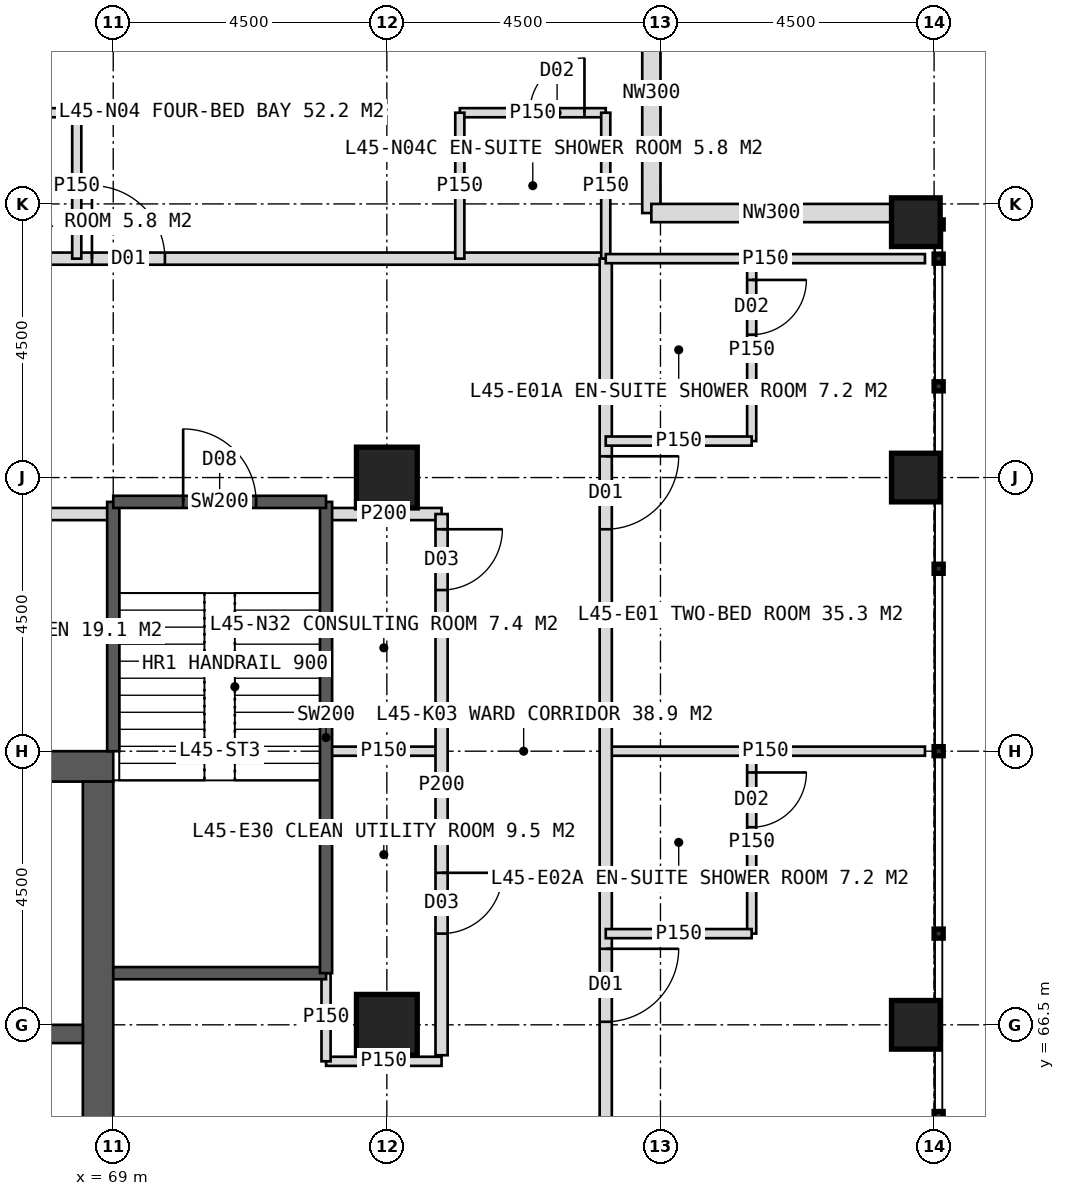
"""IFC4 building model, lengths in metres.
Left out: names, types, materials, properties, quantities, classifications, styles, units other than length and angle.
Written with IfcOpenShell. Run it as: python <this file> out.ifc"""

import sys

from ifc_helpers import new_model, si_unit, direction, frame, frame_2d, origin, origin_2d, place, context, subcontext, project, spatial, rectangle, hollow_rectangle, extrude, element, fill, save


model = new_model("IFC4")
c1 = context("Model", 3, precision=1e-05, world=origin(), true_north=direction((0.0, 1.0)))
c2 = subcontext(c1, "Body", "Model", "MODEL_VIEW")
j1 = project(units=[si_unit("LENGTHUNIT", "METRE"), si_unit("PLANEANGLEUNIT", "RADIAN")], contexts=[c1])
p1 = place(None, origin())
s1 = spatial("IfcSite", under=j1, at=p1, CompositionType="ELEMENT")
p2 = place(p1, origin())
s2 = spatial("IfcBuilding", under=s1, at=p2, CompositionType="ELEMENT")
p3 = place(p2, frame((0.0, 0.0, 189.0)))
s3 = spatial("IfcBuildingStorey", under=s2, at=p3, CompositionType="ELEMENT", Elevation=189.0)
p4 = place(p3, frame((51.0, 70.75, 0.0), z_axis=(0.0, 0.0, 1.0), x_axis=(1.0, 0.0, 0.0)))
e1 = element("IfcWall", 1, at=p4, inside=s3, PredefinedType="SHEAR", context=c2, shape_type="SweptSolid", body=[
    extrude(rectangle(XDim=18.0, YDim=0.5, at=frame_2d((9.0, 0.0))), origin(), (0.0, 0.0, 1.0), 4.0),
])
p5 = place(p4, frame((8.1, 0.0, 0.0)))
e2 = element("IfcOpeningElement", 2, at=p5, cuts=e1, PredefinedType="OPENING", context=c2, shape_type="SweptSolid", body=[
    extrude(rectangle(XDim=1.8, YDim=2.2, at=frame_2d((0.9, 1.1))), frame((0.0, 0.26, 0.0), z_axis=(0.0, -1.0, 0.0), x_axis=(1.0, 0.0, 0.0)), (0.0, 0.0, 1.0), 0.52),
])
p6 = place(p3, frame((68.75, 53.5, 0.0), z_axis=(0.0, 0.0, 1.0), x_axis=(0.0, 1.0, 0.0)))
e3 = element("IfcWall", 3, at=p6, inside=s3, PredefinedType="SHEAR", context=c2, shape_type="SweptSolid", body=[
    extrude(rectangle(XDim=17.0, YDim=0.5, at=frame_2d((8.5, 0.0))), origin(), (0.0, 0.0, 1.0), 4.0),
])
p7 = place(p6, frame((9.6, 0.0, 0.0)))
e4 = element("IfcOpeningElement", 4, at=p7, cuts=e3, PredefinedType="OPENING", context=c2, shape_type="SweptSolid", body=[
    extrude(rectangle(XDim=1.5, YDim=2.2, at=frame_2d((0.75, 1.1))), frame((0.0, 0.26, 0.0), z_axis=(0.0, -1.0, 0.0), x_axis=(1.0, 0.0, 0.0)), (0.0, 0.0, 1.0), 0.52),
])
p8 = place(p3, frame((65.2, 66.35, 0.0), z_axis=(0.0, 0.0, 1.0), x_axis=(1.0, 0.0, 0.0)))
e5 = element("IfcWall", 5, at=p8, inside=s3, PredefinedType="SHEAR", context=c2, shape_type="SweptSolid", body=[
    extrude(rectangle(XDim=3.3, YDim=0.3, at=frame_2d((1.65, 0.0))), origin(), (0.0, 0.0, 1.0), 4.0),
])
p9 = place(p8, frame((1.05, 0.0, 0.0)))
e6 = element("IfcOpeningElement", 6, at=p9, cuts=e5, PredefinedType="OPENING", context=c2, shape_type="SweptSolid", body=[
    extrude(rectangle(XDim=1.2, YDim=2.2, at=frame_2d((0.6, 1.1))), frame((0.0, 0.16, 0.0), z_axis=(0.0, -1.0, 0.0), x_axis=(1.0, 0.0, 0.0)), (0.0, 0.0, 1.0), 0.32),
])
for number, where, z_axis, x_axis in (
    (7, (73.5, 75.5, 0.0), (0.0, 0.0, 1.0), (1.0, 0.0, 0.0)),
    (8, (73.5, 66.5, 0.0), (0.0, 0.0, 1.0), (1.0, 0.0, 0.0)),
):
    element("IfcColumn", number, at=place(p3, frame(where, z_axis=z_axis, x_axis=x_axis)), inside=s3, PredefinedType="COLUMN", context=c2, shape_type="SweptSolid", body=[
        extrude(hollow_rectangle(XDim=1.0, YDim=1.0, WallThickness=0.1, at=origin_2d()), origin(), (0.0, 0.0, 1.0), 4.0),
    ])
for number, where, z_axis, x_axis in (
    (9, (82.2, 66.5, 0.0), (0.0, 0.0, 1.0), (1.0, 0.0, 0.0)),
    (10, (82.2, 75.5, 0.0), (0.0, 0.0, 1.0), (1.0, 0.0, 0.0)),
    (11, (82.2, 79.7, 0.0), (0.0, 0.0, 1.0), (1.0, 0.0, 0.0)),
):
    element("IfcColumn", number, at=place(p3, frame(where, z_axis=z_axis, x_axis=x_axis)), inside=s3, PredefinedType="COLUMN", context=c2, shape_type="SweptSolid", body=[
        extrude(hollow_rectangle(XDim=0.8, YDim=0.8, WallThickness=0.08, at=origin_2d()), origin(), (0.0, 0.0, 1.0), 4.0),
    ])
for number, where, z_axis, x_axis in (
    (12, (77.85, 83.8, 0.0), (0.0, 0.0, 1.0), (0.0, -1.0, 0.0)),
    (13, (77.85, 79.85, 0.0), (0.0, 0.0, 1.0), (1.0, 0.0, 0.0)),
):
    element("IfcWall", number, at=place(p3, frame(where, z_axis=z_axis, x_axis=x_axis)), inside=s3, PredefinedType="ELEMENTEDWALL", context=c2, shape_type="SweptSolid", body=[
        extrude(rectangle(XDim=3.95, YDim=0.3, at=frame_2d((1.975, 0.0))), origin(), (0.0, 0.0, 1.0), 2.85),
    ])
p10 = place(p3, frame((42.9, 79.1, 0.0), z_axis=(0.0, 0.0, 1.0), x_axis=(1.0, 0.0, 0.0)))
e14 = element("IfcWall", 14, at=p10, inside=s3, PredefinedType="PARTITIONING", context=c2, shape_type="SweptSolid", body=[
    extrude(rectangle(XDim=34.2, YDim=0.2, at=frame_2d((17.1, 0.0))), origin(), (0.0, 0.0, 1.0), 3.75),
])
p11 = place(p10, frame((3.25, 0.0, 0.0)))
e15 = element("IfcOpeningElement", 15, at=p11, cuts=e14, PredefinedType="OPENING", context=c2, shape_type="SweptSolid", body=[
    extrude(rectangle(XDim=1.2, YDim=2.2, at=frame_2d((0.6, 1.1))), frame((0.0, 0.11, 0.0), z_axis=(0.0, -1.0, 0.0), x_axis=(1.0, 0.0, 0.0)), (0.0, 0.0, 1.0), 0.22),
])
p12 = place(p10, frame((10.6, 0.0, 0.0)))
e16 = element("IfcOpeningElement", 16, at=p12, cuts=e14, PredefinedType="OPENING", context=c2, shape_type="SweptSolid", body=[
    extrude(rectangle(XDim=1.0, YDim=2.1, at=frame_2d((0.5, 1.05))), frame((0.0, 0.11, 0.0), z_axis=(0.0, -1.0, 0.0), x_axis=(1.0, 0.0, 0.0)), (0.0, 0.0, 1.0), 0.22),
])
p13 = place(p10, frame((17.35, 0.0, 0.0)))
e17 = element("IfcOpeningElement", 17, at=p13, cuts=e14, PredefinedType="OPENING", context=c2, shape_type="SweptSolid", body=[
    extrude(rectangle(XDim=1.2, YDim=2.2, at=frame_2d((0.6, 1.1))), frame((0.0, 0.11, 0.0), z_axis=(0.0, -1.0, 0.0), x_axis=(1.0, 0.0, 0.0)), (0.0, 0.0, 1.0), 0.22),
])
p14 = place(p10, frame((25.75, 0.0, 0.0)))
e18 = element("IfcOpeningElement", 18, at=p14, cuts=e14, PredefinedType="OPENING", context=c2, shape_type="SweptSolid", body=[
    extrude(rectangle(XDim=1.2, YDim=2.2, at=frame_2d((0.6, 1.1))), frame((0.0, 0.11, 0.0), z_axis=(0.0, -1.0, 0.0), x_axis=(1.0, 0.0, 0.0)), (0.0, 0.0, 1.0), 0.22),
])
p15 = place(p3, frame((66.0, 81.5, 0.0), z_axis=(0.0, 0.0, 1.0), x_axis=(1.0, 0.0, 0.0)))
e19 = element("IfcWall", 19, at=p15, inside=s3, PredefinedType="PARTITIONING", context=c2, shape_type="SweptSolid", body=[
    extrude(rectangle(XDim=2.4, YDim=0.15, at=frame_2d((1.2, 0.0))), origin(), (0.0, 0.0, 1.0), 3.75),
])
p16 = place(p15, frame((0.35, 0.0, 0.0)))
e20 = element("IfcOpeningElement", 20, at=p16, cuts=e19, PredefinedType="OPENING", context=c2, shape_type="SweptSolid", body=[
    extrude(rectangle(XDim=0.9, YDim=2.1, at=frame_2d((0.45, 1.05))), frame((0.0, 0.085, 0.0), z_axis=(0.0, -1.0, 0.0), x_axis=(1.0, 0.0, 0.0)), (0.0, 0.0, 1.0), 0.17),
])
p17 = place(p3, frame((68.4, 79.1, 0.0), z_axis=(0.0, 0.0, 1.0), x_axis=(0.0, 1.0, 0.0)))
e21 = element("IfcWall", 21, at=p17, inside=s3, PredefinedType="PARTITIONING", context=c2, shape_type="SweptSolid", body=[
    extrude(rectangle(XDim=2.4, YDim=0.15, at=frame_2d((1.2, 0.0))), origin(), (0.0, 0.0, 1.0), 3.75),
])
p18 = place(p3, frame((74.7, 81.5, 0.0), z_axis=(0.0, 0.0, 1.0), x_axis=(1.0, 0.0, 0.0)))
e22 = element("IfcWall", 22, at=p18, inside=s3, PredefinedType="PARTITIONING", context=c2, shape_type="SweptSolid", body=[
    extrude(rectangle(XDim=2.4, YDim=0.15, at=frame_2d((1.2, 0.0))), origin(), (0.0, 0.0, 1.0), 3.75),
])
p19 = place(p18, frame((1.15, 0.0, 0.0)))
e23 = element("IfcOpeningElement", 23, at=p19, cuts=e22, PredefinedType="OPENING", context=c2, shape_type="SweptSolid", body=[
    extrude(rectangle(XDim=0.9, YDim=2.1, at=frame_2d((0.45, 1.05))), frame((0.0, 0.085, 0.0), z_axis=(0.0, -1.0, 0.0), x_axis=(1.0, 0.0, 0.0)), (0.0, 0.0, 1.0), 0.17),
])
for number, where, z_axis, x_axis in (
    (24, (74.7, 79.1, 0.0), (0.0, 0.0, 1.0), (0.0, 1.0, 0.0)),
    (25, (77.1, 79.1, 0.0), (0.0, 0.0, 1.0), (0.0, 1.0, 0.0)),
):
    element("IfcWall", number, at=place(p3, frame(where, z_axis=z_axis, x_axis=x_axis)), inside=s3, PredefinedType="PARTITIONING", context=c2, shape_type="SweptSolid", body=[
        extrude(rectangle(XDim=2.4, YDim=0.15, at=frame_2d((1.2, 0.0))), origin(), (0.0, 0.0, 1.0), 3.75),
    ])
p20 = place(p3, frame((62.25, 74.9, 0.0), z_axis=(0.0, 0.0, 1.0), x_axis=(1.0, 0.0, 0.0)))
e26 = element("IfcWall", 26, at=p20, inside=s3, PredefinedType="PARTITIONING", context=c2, shape_type="SweptSolid", body=[
    extrude(rectangle(XDim=6.75, YDim=0.2, at=frame_2d((3.375, 0.0))), origin(), (0.0, 0.0, 1.0), 3.75),
])
p21 = place(p20, frame((4.3, 0.0, 0.0)))
e27 = element("IfcOpeningElement", 27, at=p21, cuts=e26, PredefinedType="OPENING", context=c2, shape_type="SweptSolid", body=[
    extrude(rectangle(XDim=1.0, YDim=2.1, at=frame_2d((0.5, 1.05))), frame((0.0, 0.11, 0.0), z_axis=(0.0, -1.0, 0.0), x_axis=(1.0, 0.0, 0.0)), (0.0, 0.0, 1.0), 0.22),
])
p22 = place(p3, frame((72.5, 74.9, 0.0), z_axis=(0.0, 0.0, 1.0), x_axis=(1.0, 0.0, 0.0)))
e28 = element("IfcWall", 28, at=p22, inside=s3, PredefinedType="PARTITIONING", context=c2, shape_type="SweptSolid", body=[
    extrude(rectangle(XDim=1.9, YDim=0.2, at=frame_2d((0.95, 0.0))), origin(), (0.0, 0.0, 1.0), 3.75),
])
p23 = place(p3, frame((77.1, 71.0, 0.0), z_axis=(0.0, 0.0, 1.0), x_axis=(1.0, 0.0, 0.0)))
e29 = element("IfcWall", 29, at=p23, inside=s3, PredefinedType="PARTITIONING", context=c2, shape_type="SweptSolid", body=[
    extrude(rectangle(XDim=5.25, YDim=0.15, at=frame_2d((2.625, 0.0))), origin(), (0.0, 0.0, 1.0), 3.75),
])
p24 = place(p3, frame((77.1, 79.1, 0.0), z_axis=(0.0, 0.0, 1.0), x_axis=(0.0, -1.0, 0.0)))
e30 = element("IfcWall", 30, at=p24, inside=s3, PredefinedType="PARTITIONING", context=c2, shape_type="SweptSolid", body=[
    extrude(rectangle(XDim=34.2, YDim=0.2, at=frame_2d((17.1, 0.0))), origin(), (0.0, 0.0, 1.0), 3.75),
])
p25 = place(p24, frame((3.25, 0.0, 0.0)))
e31 = element("IfcOpeningElement", 31, at=p25, cuts=e30, PredefinedType="OPENING", context=c2, shape_type="SweptSolid", body=[
    extrude(rectangle(XDim=1.2, YDim=2.2, at=frame_2d((0.6, 1.1))), frame((0.0, 0.11, 0.0), z_axis=(0.0, -1.0, 0.0), x_axis=(1.0, 0.0, 0.0)), (0.0, 0.0, 1.0), 0.22),
])
p26 = place(p24, frame((11.35, 0.0, 0.0)))
e32 = element("IfcOpeningElement", 32, at=p26, cuts=e30, PredefinedType="OPENING", context=c2, shape_type="SweptSolid", body=[
    extrude(rectangle(XDim=1.2, YDim=2.2, at=frame_2d((0.6, 1.1))), frame((0.0, 0.11, 0.0), z_axis=(0.0, -1.0, 0.0), x_axis=(1.0, 0.0, 0.0)), (0.0, 0.0, 1.0), 0.22),
])
p27 = place(p24, frame((19.75, 0.0, 0.0)))
e33 = element("IfcOpeningElement", 33, at=p27, cuts=e30, PredefinedType="OPENING", context=c2, shape_type="SweptSolid", body=[
    extrude(rectangle(XDim=1.2, YDim=2.2, at=frame_2d((0.6, 1.1))), frame((0.0, 0.11, 0.0), z_axis=(0.0, -1.0, 0.0), x_axis=(1.0, 0.0, 0.0)), (0.0, 0.0, 1.0), 0.22),
])
p28 = place(p24, frame((25.75, 0.0, 0.0)))
e34 = element("IfcOpeningElement", 34, at=p28, cuts=e30, PredefinedType="OPENING", context=c2, shape_type="SweptSolid", body=[
    extrude(rectangle(XDim=1.2, YDim=2.2, at=frame_2d((0.6, 1.1))), frame((0.0, 0.11, 0.0), z_axis=(0.0, -1.0, 0.0), x_axis=(1.0, 0.0, 0.0)), (0.0, 0.0, 1.0), 0.22),
])
p29 = place(p3, frame((77.1, 79.1, 0.0), z_axis=(0.0, 0.0, 1.0), x_axis=(1.0, 0.0, 0.0)))
e35 = element("IfcWall", 35, at=p29, inside=s3, PredefinedType="PARTITIONING", context=c2, shape_type="SweptSolid", body=[
    extrude(rectangle(XDim=5.25, YDim=0.15, at=frame_2d((2.625, 0.0))), origin(), (0.0, 0.0, 1.0), 3.75),
])
p30 = place(p3, frame((79.5, 79.1, 0.0), z_axis=(0.0, 0.0, 1.0), x_axis=(0.0, -1.0, 0.0)))
e36 = element("IfcWall", 36, at=p30, inside=s3, PredefinedType="PARTITIONING", context=c2, shape_type="SweptSolid", body=[
    extrude(rectangle(XDim=3.0, YDim=0.15, at=frame_2d((1.5, 0.0))), origin(), (0.0, 0.0, 1.0), 3.75),
])
p31 = place(p30, frame((0.35, 0.0, 0.0)))
e37 = element("IfcOpeningElement", 37, at=p31, cuts=e36, PredefinedType="OPENING", context=c2, shape_type="SweptSolid", body=[
    extrude(rectangle(XDim=0.9, YDim=2.1, at=frame_2d((0.45, 1.05))), frame((0.0, 0.085, 0.0), z_axis=(0.0, -1.0, 0.0), x_axis=(1.0, 0.0, 0.0)), (0.0, 0.0, 1.0), 0.17),
])
p32 = place(p3, frame((77.1, 76.1, 0.0), z_axis=(0.0, 0.0, 1.0), x_axis=(1.0, 0.0, 0.0)))
e38 = element("IfcWall", 38, at=p32, inside=s3, PredefinedType="PARTITIONING", context=c2, shape_type="SweptSolid", body=[
    extrude(rectangle(XDim=2.4, YDim=0.15, at=frame_2d((1.2, 0.0))), origin(), (0.0, 0.0, 1.0), 3.75),
])
p33 = place(p3, frame((79.5, 71.0, 0.0), z_axis=(0.0, 0.0, 1.0), x_axis=(0.0, -1.0, 0.0)))
e39 = element("IfcWall", 39, at=p33, inside=s3, PredefinedType="PARTITIONING", context=c2, shape_type="SweptSolid", body=[
    extrude(rectangle(XDim=3.0, YDim=0.15, at=frame_2d((1.5, 0.0))), origin(), (0.0, 0.0, 1.0), 3.75),
])
p34 = place(p33, frame((0.35, 0.0, 0.0)))
e40 = element("IfcOpeningElement", 40, at=p34, cuts=e39, PredefinedType="OPENING", context=c2, shape_type="SweptSolid", body=[
    extrude(rectangle(XDim=0.9, YDim=2.1, at=frame_2d((0.45, 1.05))), frame((0.0, 0.085, 0.0), z_axis=(0.0, -1.0, 0.0), x_axis=(1.0, 0.0, 0.0)), (0.0, 0.0, 1.0), 0.17),
])
p35 = place(p3, frame((77.1, 68.0, 0.0), z_axis=(0.0, 0.0, 1.0), x_axis=(1.0, 0.0, 0.0)))
e41 = element("IfcWall", 41, at=p35, inside=s3, PredefinedType="PARTITIONING", context=c2, shape_type="SweptSolid", body=[
    extrude(rectangle(XDim=2.4, YDim=0.15, at=frame_2d((1.2, 0.0))), origin(), (0.0, 0.0, 1.0), 3.75),
])
p36 = place(p3, frame((72.5, 71.0, 0.0), z_axis=(0.0, 0.0, 1.0), x_axis=(1.0, 0.0, 0.0)))
e42 = element("IfcWall", 42, at=p36, inside=s3, PredefinedType="PARTITIONING", context=c2, shape_type="SweptSolid", body=[
    extrude(rectangle(XDim=1.9, YDim=0.15, at=frame_2d((0.95, 0.0))), origin(), (0.0, 0.0, 1.0), 3.75),
])
p37 = place(p3, frame((74.4, 74.9, 0.0), z_axis=(0.0, 0.0, 1.0), x_axis=(0.0, -1.0, 0.0)))
e43 = element("IfcWall", 43, at=p37, inside=s3, PredefinedType="PARTITIONING", context=c2, shape_type="SweptSolid", body=[
    extrude(rectangle(XDim=8.9, YDim=0.2, at=frame_2d((4.45, 0.0))), origin(), (0.0, 0.0, 1.0), 3.75),
])
p38 = place(p37, frame((0.25, 0.0, 0.0)))
e44 = element("IfcOpeningElement", 44, at=p38, cuts=e43, PredefinedType="OPENING", context=c2, shape_type="SweptSolid", body=[
    extrude(rectangle(XDim=1.0, YDim=2.1, at=frame_2d((0.5, 1.05))), frame((0.0, 0.11, 0.0), z_axis=(0.0, -1.0, 0.0), x_axis=(1.0, 0.0, 0.0)), (0.0, 0.0, 1.0), 0.22),
])
p39 = place(p37, frame((5.9, 0.0, 0.0)))
e45 = element("IfcOpeningElement", 45, at=p39, cuts=e43, PredefinedType="OPENING", context=c2, shape_type="SweptSolid", body=[
    extrude(rectangle(XDim=1.0, YDim=2.1, at=frame_2d((0.5, 1.05))), frame((0.0, 0.11, 0.0), z_axis=(0.0, -1.0, 0.0), x_axis=(1.0, 0.0, 0.0)), (0.0, 0.0, 1.0), 0.22),
])
p40 = place(p3, frame((72.5, 65.9, 0.0), z_axis=(0.0, 0.0, 1.0), x_axis=(1.0, 0.0, 0.0)))
e46 = element("IfcWall", 46, at=p40, inside=s3, PredefinedType="PARTITIONING", context=c2, shape_type="SweptSolid", body=[
    extrude(rectangle(XDim=1.9, YDim=0.15, at=frame_2d((0.95, 0.0))), origin(), (0.0, 0.0, 1.0), 3.75),
])
p41 = place(p3, frame((72.5, 65.9, 0.0), z_axis=(0.0, 0.0, 1.0), x_axis=(0.0, 1.0, 0.0)))
e47 = element("IfcWall", 47, at=p41, inside=s3, PredefinedType="PARTITIONING", context=c2, shape_type="SweptSolid", body=[
    extrude(rectangle(XDim=1.45, YDim=0.15, at=frame_2d((0.725, 0.0))), origin(), (0.0, 0.0, 1.0), 3.75),
])
p42 = place(p3, frame((69.0, 71.0, 0.0), z_axis=(0.0, 0.0, 1.0), x_axis=(0.0, 1.0, 0.0)))
e48 = element("IfcWall", 48, at=p42, inside=s3, PredefinedType="SOLIDWALL", context=c2, shape_type="SweptSolid", body=[
    extrude(rectangle(XDim=4.1, YDim=0.2, at=frame_2d((2.05, 0.0))), origin(), (0.0, 0.0, 1.0), 3.75),
])
p43 = place(p3, frame((69.0, 67.35, 0.0), z_axis=(0.0, 0.0, 1.0), x_axis=(1.0, 0.0, 0.0)))
e49 = element("IfcWall", 49, at=p43, inside=s3, PredefinedType="SOLIDWALL", context=c2, shape_type="SweptSolid", body=[
    extrude(rectangle(XDim=3.5, YDim=0.2, at=frame_2d((1.75, 0.0))), origin(), (0.0, 0.0, 1.0), 3.75),
])
p44 = place(p3, frame((72.5, 67.35, 0.0), z_axis=(0.0, 0.0, 1.0), x_axis=(0.0, 1.0, 0.0)))
e50 = element("IfcWall", 50, at=p44, inside=s3, PredefinedType="SOLIDWALL", context=c2, shape_type="SweptSolid", body=[
    extrude(rectangle(XDim=7.75, YDim=0.2, at=frame_2d((3.875, 0.0))), origin(), (0.0, 0.0, 1.0), 3.75),
])
p45 = place(p3, frame((69.0, 75.1, 0.0), z_axis=(0.0, 0.0, 1.0), x_axis=(1.0, 0.0, 0.0)))
e51 = element("IfcWall", 51, at=p45, inside=s3, PredefinedType="SOLIDWALL", context=c2, shape_type="SweptSolid", body=[
    extrude(rectangle(XDim=3.5, YDim=0.2, at=frame_2d((1.75, 0.0))), origin(), (0.0, 0.0, 1.0), 3.75),
])
p46 = place(p45, frame((1.15, 0.0, 0.0)))
e52 = element("IfcOpeningElement", 52, at=p46, cuts=e51, PredefinedType="OPENING", context=c2, shape_type="SweptSolid", body=[
    extrude(rectangle(XDim=1.2, YDim=2.1, at=frame_2d((0.6, 1.05))), frame((0.0, 0.11, 0.0), z_axis=(0.0, -1.0, 0.0), x_axis=(1.0, 0.0, 0.0)), (0.0, 0.0, 1.0), 0.22),
])
p47 = place(p14, origin())
e53 = element("IfcDoor", 53, at=p47, inside=s3, OperationType="SINGLE_SWING_LEFT", PredefinedType="DOOR", context=c2, shape_type="SweptSolid", body=[
    extrude(rectangle(XDim=1.2, YDim=2.2, at=frame_2d((0.6, 1.1))), frame((0.0, 0.025, 0.0), z_axis=(0.0, -1.0, 0.0), x_axis=(1.0, 0.0, 0.0)), (0.0, 0.0, 1.0), 0.05),
])
fill(e18, e53)
p48 = place(p19, origin())
e54 = element("IfcDoor", 54, at=p48, inside=s3, OperationType="SINGLE_SWING_RIGHT", PredefinedType="DOOR", context=c2, shape_type="SweptSolid", body=[
    extrude(rectangle(XDim=0.9, YDim=2.1, at=frame_2d((0.45, 1.05))), frame((0.0, 0.025, 0.0), z_axis=(0.0, -1.0, 0.0), x_axis=(1.0, 0.0, 0.0)), (0.0, 0.0, 1.0), 0.05),
])
fill(e23, e54)
p49 = place(p38, origin())
e55 = element("IfcDoor", 55, at=p49, inside=s3, OperationType="SINGLE_SWING_LEFT", PredefinedType="DOOR", context=c2, shape_type="SweptSolid", body=[
    extrude(rectangle(XDim=1.0, YDim=2.1, at=frame_2d((0.5, 1.05))), frame((0.0, 0.025, 0.0), z_axis=(0.0, -1.0, 0.0), x_axis=(1.0, 0.0, 0.0)), (0.0, 0.0, 1.0), 0.05),
])
fill(e44, e55)
p50 = place(p25, origin())
e56 = element("IfcDoor", 56, at=p50, inside=s3, OperationType="SINGLE_SWING_LEFT", PredefinedType="DOOR", context=c2, shape_type="SweptSolid", body=[
    extrude(rectangle(XDim=1.2, YDim=2.2, at=frame_2d((0.6, 1.1))), frame((0.0, 0.025, 0.0), z_axis=(0.0, -1.0, 0.0), x_axis=(1.0, 0.0, 0.0)), (0.0, 0.0, 1.0), 0.05),
])
fill(e31, e56)
p51 = place(p31, origin())
e57 = element("IfcDoor", 57, at=p51, inside=s3, OperationType="SINGLE_SWING_LEFT", PredefinedType="DOOR", context=c2, shape_type="SweptSolid", body=[
    extrude(rectangle(XDim=0.9, YDim=2.1, at=frame_2d((0.45, 1.05))), frame((0.0, 0.025, 0.0), z_axis=(0.0, -1.0, 0.0), x_axis=(1.0, 0.0, 0.0)), (0.0, 0.0, 1.0), 0.05),
])
fill(e37, e57)
p52 = place(p26, origin())
e58 = element("IfcDoor", 58, at=p52, inside=s3, OperationType="SINGLE_SWING_LEFT", PredefinedType="DOOR", context=c2, shape_type="SweptSolid", body=[
    extrude(rectangle(XDim=1.2, YDim=2.2, at=frame_2d((0.6, 1.1))), frame((0.0, 0.025, 0.0), z_axis=(0.0, -1.0, 0.0), x_axis=(1.0, 0.0, 0.0)), (0.0, 0.0, 1.0), 0.05),
])
fill(e32, e58)
p53 = place(p34, origin())
e59 = element("IfcDoor", 59, at=p53, inside=s3, OperationType="SINGLE_SWING_LEFT", PredefinedType="DOOR", context=c2, shape_type="SweptSolid", body=[
    extrude(rectangle(XDim=0.9, YDim=2.1, at=frame_2d((0.45, 1.05))), frame((0.0, 0.025, 0.0), z_axis=(0.0, -1.0, 0.0), x_axis=(1.0, 0.0, 0.0)), (0.0, 0.0, 1.0), 0.05),
])
fill(e40, e59)
p54 = place(p39, origin())
e60 = element("IfcDoor", 60, at=p54, inside=s3, OperationType="SINGLE_SWING_LEFT", PredefinedType="DOOR", context=c2, shape_type="SweptSolid", body=[
    extrude(rectangle(XDim=1.0, YDim=2.1, at=frame_2d((0.5, 1.05))), frame((0.0, 0.025, 0.0), z_axis=(0.0, -1.0, 0.0), x_axis=(1.0, 0.0, 0.0)), (0.0, 0.0, 1.0), 0.05),
])
fill(e45, e60)
p55 = place(p46, origin())
e61 = element("IfcDoor", 61, at=p55, inside=s3, OperationType="SINGLE_SWING_LEFT", PredefinedType="DOOR", context=c2, shape_type="SweptSolid", body=[
    extrude(rectangle(XDim=1.2, YDim=2.1, at=frame_2d((0.6, 1.05))), frame((0.0, 0.025, 0.0), z_axis=(0.0, -1.0, 0.0), x_axis=(1.0, 0.0, 0.0)), (0.0, 0.0, 1.0), 0.05),
])
fill(e52, e61)
save(model, sys.argv[1])
